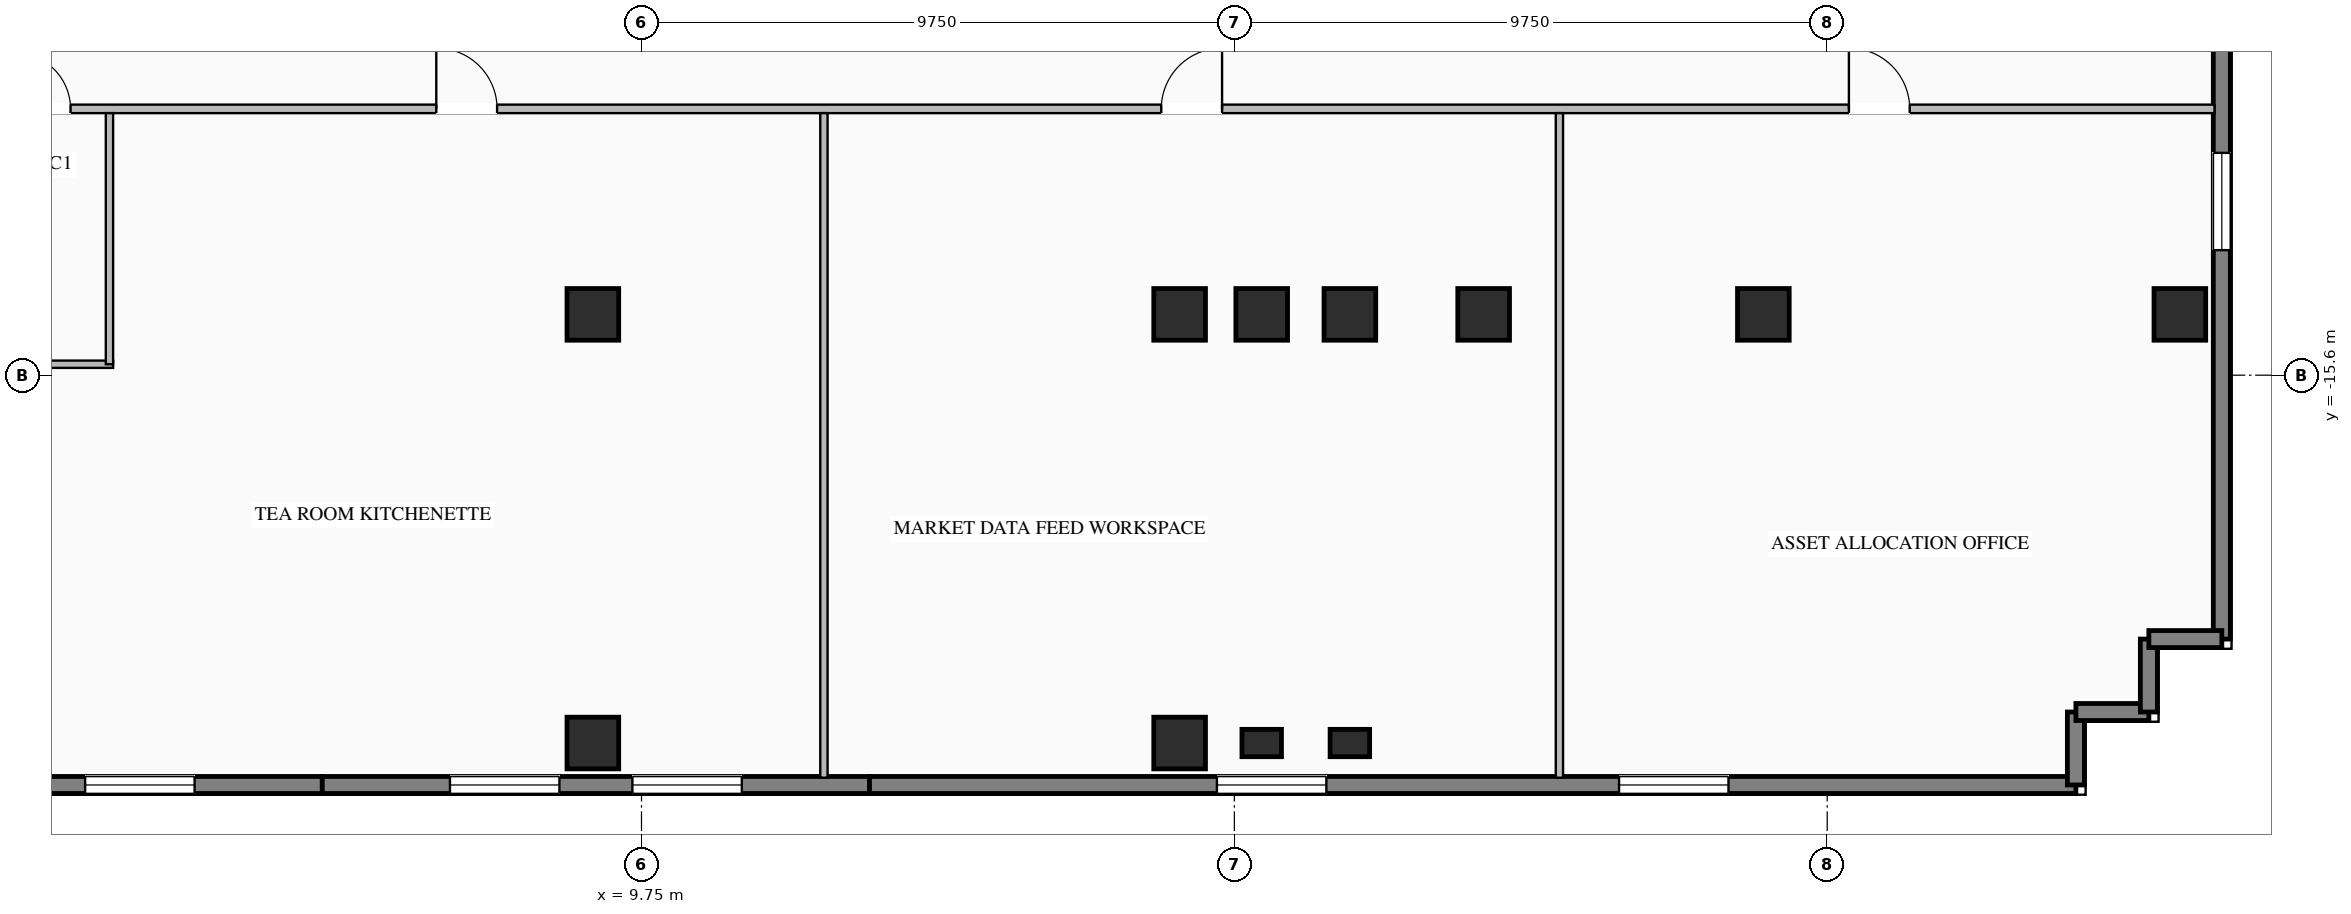
"""IFC4 building model, lengths in metres.
Left out: names, types, materials, properties, quantities, classifications, styles, units other than length and angle.
Written with IfcOpenShell. Run it as: python <this file> out.ifc"""

import sys

from ifc_helpers import new_model, si_unit, direction, frame, frame_2d, origin, origin_2d, place, context, subcontext, project, spatial, rectangle, i_section, extrude, element, fill, save


model = new_model("IFC4")
c1 = context("Model", 3, precision=1e-05, world=origin(), true_north=direction((0.0, 1.0)))
c2 = subcontext(c1, "Body", "Model", "MODEL_VIEW")
j1 = project(units=[si_unit("LENGTHUNIT", "METRE"), si_unit("PLANEANGLEUNIT", "RADIAN")], contexts=[c1])
p1 = place(None, origin())
s1 = spatial("IfcSite", under=j1, at=p1, CompositionType="ELEMENT")
p2 = place(p1, origin())
s2 = spatial("IfcBuilding", under=s1, at=p2, CompositionType="ELEMENT")
p3 = place(p2, frame((0.0, 0.0, 51.9)))
s3 = spatial("IfcBuildingStorey", under=s2, at=p3, CompositionType="ELEMENT", Elevation=51.9)
for number, where, z_axis, x_axis in (
    (1, (8.95, -14.6, 0.0), (0.0, 0.0, 1.0), (1.0, 0.0, 0.0)),
    (2, (18.6, -14.6, 0.0), (0.0, 0.0, 1.0), (1.0, 0.0, 0.0)),
    (3, (19.95, -14.6, 0.0), (0.0, 0.0, 1.0), (1.0, 0.0, 0.0)),
    (4, (21.4, -14.6, 0.0), (0.0, 0.0, 1.0), (1.0, 0.0, 0.0)),
    (5, (23.6, -14.6, 0.0), (0.0, 0.0, 1.0), (1.0, 0.0, 0.0)),
    (6, (28.2, -14.6, 0.0), (0.0, 0.0, 1.0), (1.0, 0.0, 0.0)),
    (7, (8.95, -21.65, 0.0), (0.0, 0.0, 1.0), (1.0, 0.0, 0.0)),
    (8, (18.6, -21.65, 0.0), (0.0, 0.0, 1.0), (1.0, 0.0, 0.0)),
    (9, (35.05, -14.6, 0.0), (0.0, 0.0, 1.0), (1.0, 0.0, 0.0)),
):
    element("IfcColumn", number, at=place(p3, frame(where, z_axis=z_axis, x_axis=x_axis)), inside=s3, PredefinedType="COLUMN", context=c2, shape_type="SweptSolid", body=[
        extrude(i_section(OverallWidth=0.85, OverallDepth=0.85, WebThickness=0.032, FlangeThickness=0.048, at=origin_2d()), origin(), (0.0, 0.0, 1.0), 3.45),
    ])
for number, where, z_axis, x_axis in (
    (10, (19.95, -21.65, 0.0), (0.0, 0.0, 1.0), (1.0, 0.0, 0.0)),
    (11, (21.4, -21.65, 0.0), (0.0, 0.0, 1.0), (1.0, 0.0, 0.0)),
):
    element("IfcColumn", number, at=place(p3, frame(where, z_axis=z_axis, x_axis=x_axis)), inside=s3, PredefinedType="PILASTER", context=c2, shape_type="SweptSolid", body=[
        extrude(rectangle(XDim=0.65, YDim=0.45, at=origin_2d()), origin(), (0.0, 0.0, 1.0), 3.45),
    ])
p4 = place(p3, frame((4.5, -22.34, 0.0), z_axis=(0.0, 0.0, 1.0), x_axis=(-1.0, 0.0, 0.0)))
e12 = element("IfcWall", 12, at=p4, inside=s3, PredefinedType="STANDARD", context=c2, shape_type="SweptSolid", body=[
    extrude(rectangle(XDim=9.0, YDim=0.28, at=frame_2d((4.5, 0.0))), origin(), (0.0, 0.0, 1.0), 3.25),
])
p5 = place(p4, frame((2.1, 0.0, 0.76)))
e13 = element("IfcOpeningElement", 13, at=p5, cuts=e12, PredefinedType="OPENING", context=c2, shape_type="SweptSolid", body=[
    extrude(rectangle(XDim=1.8, YDim=1.95, at=frame_2d((0.9, 0.975))), frame((0.0, 0.15, 0.0), z_axis=(0.0, -1.0, 0.0), x_axis=(1.0, 0.0, 0.0)), (0.0, 0.0, 1.0), 0.3),
])
p6 = place(p4, frame((5.1, 0.0, 0.76)))
e14 = element("IfcOpeningElement", 14, at=p6, cuts=e12, PredefinedType="OPENING", context=c2, shape_type="SweptSolid", body=[
    extrude(rectangle(XDim=1.8, YDim=1.95, at=frame_2d((0.9, 0.975))), frame((0.0, 0.15, 0.0), z_axis=(0.0, -1.0, 0.0), x_axis=(1.0, 0.0, 0.0)), (0.0, 0.0, 1.0), 0.3),
])
p7 = place(p3, frame((13.5, -22.34, 0.0), z_axis=(0.0, 0.0, 1.0), x_axis=(-1.0, 0.0, 0.0)))
e15 = element("IfcWall", 15, at=p7, inside=s3, PredefinedType="STANDARD", context=c2, shape_type="SweptSolid", body=[
    extrude(rectangle(XDim=9.0, YDim=0.28, at=frame_2d((4.5, 0.0))), origin(), (0.0, 0.0, 1.0), 3.25),
])
p8 = place(p7, frame((2.1, 0.0, 0.76)))
e16 = element("IfcOpeningElement", 16, at=p8, cuts=e15, PredefinedType="OPENING", context=c2, shape_type="SweptSolid", body=[
    extrude(rectangle(XDim=1.8, YDim=1.95, at=frame_2d((0.9, 0.975))), frame((0.0, 0.15, 0.0), z_axis=(0.0, -1.0, 0.0), x_axis=(1.0, 0.0, 0.0)), (0.0, 0.0, 1.0), 0.3),
])
p9 = place(p7, frame((5.1, 0.0, 0.76)))
e17 = element("IfcOpeningElement", 17, at=p9, cuts=e15, PredefinedType="OPENING", context=c2, shape_type="SweptSolid", body=[
    extrude(rectangle(XDim=1.8, YDim=1.95, at=frame_2d((0.9, 0.975))), frame((0.0, 0.15, 0.0), z_axis=(0.0, -1.0, 0.0), x_axis=(1.0, 0.0, 0.0)), (0.0, 0.0, 1.0), 0.3),
])
p10 = place(p3, frame((33.34, -22.34, 0.0), z_axis=(0.0, 0.0, 1.0), x_axis=(-1.0, 0.0, 0.0)))
e18 = element("IfcWall", 18, at=p10, inside=s3, PredefinedType="STANDARD", context=c2, shape_type="SweptSolid", body=[
    extrude(rectangle(XDim=19.84, YDim=0.28, at=frame_2d((9.92, 0.0))), origin(), (0.0, 0.0, 1.0), 3.25),
])
p11 = place(p10, frame((5.713, 0.0, 0.76)))
e19 = element("IfcOpeningElement", 19, at=p11, cuts=e18, PredefinedType="OPENING", context=c2, shape_type="SweptSolid", body=[
    extrude(rectangle(XDim=1.8, YDim=1.95, at=frame_2d((0.9, 0.975))), frame((0.0, 0.15, 0.0), z_axis=(0.0, -1.0, 0.0), x_axis=(1.0, 0.0, 0.0)), (0.0, 0.0, 1.0), 0.3),
])
p12 = place(p10, frame((12.327, 0.0, 0.76)))
e20 = element("IfcOpeningElement", 20, at=p12, cuts=e18, PredefinedType="OPENING", context=c2, shape_type="SweptSolid", body=[
    extrude(rectangle(XDim=1.8, YDim=1.95, at=frame_2d((0.9, 0.975))), frame((0.0, 0.15, 0.0), z_axis=(0.0, -1.0, 0.0), x_axis=(1.0, 0.0, 0.0)), (0.0, 0.0, 1.0), 0.3),
])
p13 = place(p3, frame((35.74, 0.0, 0.0), z_axis=(0.0, 0.0, 1.0), x_axis=(0.0, -1.0, 0.0)))
e21 = element("IfcWall", 21, at=p13, inside=s3, PredefinedType="STANDARD", context=c2, shape_type="SweptSolid", body=[
    extrude(rectangle(XDim=19.94, YDim=0.28, at=frame_2d((9.97, 0.0))), origin(), (0.0, 0.0, 1.0), 3.25),
])
p14 = place(p13, frame((5.847, 0.0, 0.76)))
e22 = element("IfcOpeningElement", 22, at=p14, cuts=e21, PredefinedType="OPENING", context=c2, shape_type="SweptSolid", body=[
    extrude(rectangle(XDim=1.6, YDim=1.95, at=frame_2d((0.8, 0.975))), frame((0.0, 0.15, 0.0), z_axis=(0.0, -1.0, 0.0), x_axis=(1.0, 0.0, 0.0)), (0.0, 0.0, 1.0), 0.3),
])
p15 = place(p13, frame((11.943, 0.0, 0.76)))
e23 = element("IfcOpeningElement", 23, at=p15, cuts=e21, PredefinedType="OPENING", context=c2, shape_type="SweptSolid", body=[
    extrude(rectangle(XDim=1.6, YDim=1.95, at=frame_2d((0.8, 0.975))), frame((0.0, 0.15, 0.0), z_axis=(0.0, -1.0, 0.0), x_axis=(1.0, 0.0, 0.0)), (0.0, 0.0, 1.0), 0.3),
])
p16 = place(p3, frame((33.34, -22.34, 0.0), z_axis=(0.0, 0.0, 1.0), x_axis=(0.0, 1.0, 0.0)))
e24 = element("IfcWall", 24, at=p16, inside=s3, PredefinedType="STANDARD", context=c2, shape_type="SweptSolid", body=[
    extrude(rectangle(XDim=1.2, YDim=0.28, at=frame_2d((0.6, 0.0))), origin(), (0.0, 0.0, 1.0), 3.25),
])
for number, where, z_axis, x_axis in (
    (25, (33.34, -21.14, 0.0), (0.0, 0.0, 1.0), (1.0, 0.0, 0.0)),
    (26, (34.54, -21.14, 0.0), (0.0, 0.0, 1.0), (0.0, 1.0, 0.0)),
    (27, (34.54, -19.94, 0.0), (0.0, 0.0, 1.0), (1.0, 0.0, 0.0)),
):
    element("IfcWall", number, at=place(p3, frame(where, z_axis=z_axis, x_axis=x_axis)), inside=s3, PredefinedType="STANDARD", context=c2, shape_type="SweptSolid", body=[
        extrude(rectangle(XDim=1.2, YDim=0.28, at=frame_2d((0.6, 0.0))), origin(), (0.0, 0.0, 1.0), 3.25),
    ])
p17 = place(p3, frame((-35.62, -11.22, 0.0), z_axis=(0.0, 0.0, 1.0), x_axis=(1.0, 0.0, 0.0)))
e28 = element("IfcWall", 28, at=p17, inside=s3, PredefinedType="STANDARD", context=c2, shape_type="SweptSolid", body=[
    extrude(rectangle(XDim=71.24, YDim=0.14, at=frame_2d((35.62, 0.0))), origin(), (0.0, 0.0, 1.0), 2.745),
])
p18 = place(p17, frame((28.71, 0.0, 0.0)))
e29 = element("IfcOpeningElement", 29, at=p18, cuts=e28, PredefinedType="OPENING", context=c2, shape_type="SweptSolid", body=[
    extrude(rectangle(XDim=0.92, YDim=2.08, at=frame_2d((0.46, 1.04))), frame((0.0, 0.08, 0.0), z_axis=(0.0, -1.0, 0.0), x_axis=(1.0, 0.0, 0.0)), (0.0, 0.0, 1.0), 0.16),
])
p19 = place(p17, frame((32.21, 0.0, 0.0)))
e30 = element("IfcOpeningElement", 30, at=p19, cuts=e28, PredefinedType="OPENING", context=c2, shape_type="SweptSolid", body=[
    extrude(rectangle(XDim=0.92, YDim=2.08, at=frame_2d((0.46, 1.04))), frame((0.0, 0.08, 0.0), z_axis=(0.0, -1.0, 0.0), x_axis=(1.0, 0.0, 0.0)), (0.0, 0.0, 1.0), 0.16),
])
p20 = place(p17, frame((35.06, 0.0, 0.0)))
e31 = element("IfcOpeningElement", 31, at=p20, cuts=e28, PredefinedType="OPENING", context=c2, shape_type="SweptSolid", body=[
    extrude(rectangle(XDim=0.92, YDim=2.08, at=frame_2d((0.46, 1.04))), frame((0.0, 0.08, 0.0), z_axis=(0.0, -1.0, 0.0), x_axis=(1.0, 0.0, 0.0)), (0.0, 0.0, 1.0), 0.16),
])
p21 = place(p17, frame((4.307, 0.0, 0.0)))
e32 = element("IfcOpeningElement", 32, at=p21, cuts=e28, PredefinedType="OPENING", context=c2, shape_type="SweptSolid", body=[
    extrude(rectangle(XDim=1.0, YDim=2.08, at=frame_2d((0.5, 1.04))), frame((0.0, 0.08, 0.0), z_axis=(0.0, -1.0, 0.0), x_axis=(1.0, 0.0, 0.0)), (0.0, 0.0, 1.0), 0.16),
])
p22 = place(p17, frame((13.65, 0.0, 0.0)))
e33 = element("IfcOpeningElement", 33, at=p22, cuts=e28, PredefinedType="OPENING", context=c2, shape_type="SweptSolid", body=[
    extrude(rectangle(XDim=1.0, YDim=2.08, at=frame_2d((0.5, 1.04))), frame((0.0, 0.08, 0.0), z_axis=(0.0, -1.0, 0.0), x_axis=(1.0, 0.0, 0.0)), (0.0, 0.0, 1.0), 0.16),
])
p23 = place(p17, frame((22.679, 0.0, 0.0)))
e34 = element("IfcOpeningElement", 34, at=p23, cuts=e28, PredefinedType="OPENING", context=c2, shape_type="SweptSolid", body=[
    extrude(rectangle(XDim=1.0, YDim=2.08, at=frame_2d((0.5, 1.04))), frame((0.0, 0.08, 0.0), z_axis=(0.0, -1.0, 0.0), x_axis=(1.0, 0.0, 0.0)), (0.0, 0.0, 1.0), 0.16),
])
p24 = place(p17, frame((41.995, 0.0, 0.0)))
e35 = element("IfcOpeningElement", 35, at=p24, cuts=e28, PredefinedType="OPENING", context=c2, shape_type="SweptSolid", body=[
    extrude(rectangle(XDim=1.0, YDim=2.08, at=frame_2d((0.5, 1.04))), frame((0.0, 0.08, 0.0), z_axis=(0.0, -1.0, 0.0), x_axis=(1.0, 0.0, 0.0)), (0.0, 0.0, 1.0), 0.16),
])
p25 = place(p17, frame((53.918, 0.0, 0.0)))
e36 = element("IfcOpeningElement", 36, at=p25, cuts=e28, PredefinedType="OPENING", context=c2, shape_type="SweptSolid", body=[
    extrude(rectangle(XDim=1.0, YDim=2.08, at=frame_2d((0.5, 1.04))), frame((0.0, 0.08, 0.0), z_axis=(0.0, -1.0, 0.0), x_axis=(1.0, 0.0, 0.0)), (0.0, 0.0, 1.0), 0.16),
])
p26 = place(p17, frame((65.227, 0.0, 0.0)))
e37 = element("IfcOpeningElement", 37, at=p26, cuts=e28, PredefinedType="OPENING", context=c2, shape_type="SweptSolid", body=[
    extrude(rectangle(XDim=1.0, YDim=2.08, at=frame_2d((0.5, 1.04))), frame((0.0, 0.08, 0.0), z_axis=(0.0, -1.0, 0.0), x_axis=(1.0, 0.0, 0.0)), (0.0, 0.0, 1.0), 0.16),
])
p27 = place(p3, frame((-8.26, -15.42, 0.0), z_axis=(0.0, 0.0, 1.0), x_axis=(1.0, 0.0, 0.0)))
e38 = element("IfcWall", 38, at=p27, inside=s3, PredefinedType="STANDARD", context=c2, shape_type="SweptSolid", body=[
    extrude(rectangle(XDim=9.32, YDim=0.12, at=frame_2d((4.66, 0.0))), origin(), (0.0, 0.0, 1.0), 3.25),
])
p28 = place(p3, frame((1.0, -15.42, 0.0), z_axis=(0.0, 0.0, 1.0), x_axis=(0.0, 1.0, 0.0)))
e39 = element("IfcWall", 39, at=p28, inside=s3, PredefinedType="STANDARD", context=c2, shape_type="SweptSolid", body=[
    extrude(rectangle(XDim=4.13, YDim=0.12, at=frame_2d((2.065, 0.0))), origin(), (0.0, 0.0, 1.0), 3.25),
])
for number, where, z_axis, x_axis in (
    (40, (12.75, -22.22, 0.0), (0.0, 0.0, 1.0), (0.0, 1.0, 0.0)),
    (41, (24.846, -22.22, 0.0), (0.0, 0.0, 1.0), (0.0, 1.0, 0.0)),
):
    element("IfcWall", number, at=place(p3, frame(where, z_axis=z_axis, x_axis=x_axis)), inside=s3, PredefinedType="STANDARD", context=c2, shape_type="SweptSolid", body=[
        extrude(rectangle(XDim=10.93, YDim=0.12, at=frame_2d((5.465, 0.0))), origin(), (0.0, 0.0, 1.0), 3.25),
    ])
p29 = place(p5, origin())
e42 = element("IfcWindow", 42, at=p29, inside=s3, PartitioningType="SINGLE_PANEL", PredefinedType="WINDOW", context=c2, shape_type="SweptSolid", body=[
    extrude(rectangle(XDim=1.8, YDim=1.95, at=frame_2d((0.9, 0.975))), frame((0.0, 0.03, 0.0), z_axis=(0.0, -1.0, 0.0), x_axis=(1.0, 0.0, 0.0)), (0.0, 0.0, 1.0), 0.06),
])
fill(e13, e42)
p30 = place(p8, origin())
e43 = element("IfcWindow", 43, at=p30, inside=s3, PartitioningType="SINGLE_PANEL", PredefinedType="WINDOW", context=c2, shape_type="SweptSolid", body=[
    extrude(rectangle(XDim=1.8, YDim=1.95, at=frame_2d((0.9, 0.975))), frame((0.0, 0.03, 0.0), z_axis=(0.0, -1.0, 0.0), x_axis=(1.0, 0.0, 0.0)), (0.0, 0.0, 1.0), 0.06),
])
fill(e16, e43)
p31 = place(p9, origin())
e44 = element("IfcWindow", 44, at=p31, inside=s3, PartitioningType="SINGLE_PANEL", PredefinedType="WINDOW", context=c2, shape_type="SweptSolid", body=[
    extrude(rectangle(XDim=1.8, YDim=1.95, at=frame_2d((0.9, 0.975))), frame((0.0, 0.03, 0.0), z_axis=(0.0, -1.0, 0.0), x_axis=(1.0, 0.0, 0.0)), (0.0, 0.0, 1.0), 0.06),
])
fill(e17, e44)
p32 = place(p11, origin())
e45 = element("IfcWindow", 45, at=p32, inside=s3, PartitioningType="SINGLE_PANEL", PredefinedType="WINDOW", context=c2, shape_type="SweptSolid", body=[
    extrude(rectangle(XDim=1.8, YDim=1.95, at=frame_2d((0.9, 0.975))), frame((0.0, 0.03, 0.0), z_axis=(0.0, -1.0, 0.0), x_axis=(1.0, 0.0, 0.0)), (0.0, 0.0, 1.0), 0.06),
])
fill(e19, e45)
p33 = place(p12, origin())
e46 = element("IfcWindow", 46, at=p33, inside=s3, PartitioningType="SINGLE_PANEL", PredefinedType="WINDOW", context=c2, shape_type="SweptSolid", body=[
    extrude(rectangle(XDim=1.8, YDim=1.95, at=frame_2d((0.9, 0.975))), frame((0.0, 0.03, 0.0), z_axis=(0.0, -1.0, 0.0), x_axis=(1.0, 0.0, 0.0)), (0.0, 0.0, 1.0), 0.06),
])
fill(e20, e46)
p34 = place(p15, origin())
e47 = element("IfcWindow", 47, at=p34, inside=s3, PartitioningType="SINGLE_PANEL", PredefinedType="WINDOW", context=c2, shape_type="SweptSolid", body=[
    extrude(rectangle(XDim=1.6, YDim=1.95, at=frame_2d((0.8, 0.975))), frame((0.0, 0.03, 0.0), z_axis=(0.0, -1.0, 0.0), x_axis=(1.0, 0.0, 0.0)), (0.0, 0.0, 1.0), 0.06),
])
fill(e23, e47)
p35 = place(p20, origin())
e48 = element("IfcDoor", 48, at=p35, inside=s3, OperationType="SINGLE_SWING_LEFT", PredefinedType="DOOR", context=c2, shape_type="SweptSolid", body=[
    extrude(rectangle(XDim=0.92, YDim=2.08, at=frame_2d((0.46, 1.04))), frame((0.0, 0.025, 0.0), z_axis=(0.0, -1.0, 0.0), x_axis=(1.0, 0.0, 0.0)), (0.0, 0.0, 1.0), 0.05),
])
fill(e31, e48)
p36 = place(p24, origin())
e49 = element("IfcDoor", 49, at=p36, inside=s3, OperationType="SINGLE_SWING_LEFT", PredefinedType="DOOR", context=c2, shape_type="SweptSolid", body=[
    extrude(rectangle(XDim=1.0, YDim=2.08, at=frame_2d((0.5, 1.04))), frame((0.0, 0.025, 0.0), z_axis=(0.0, -1.0, 0.0), x_axis=(1.0, 0.0, 0.0)), (0.0, 0.0, 1.0), 0.05),
])
fill(e35, e49)
p37 = place(p25, origin())
e50 = element("IfcDoor", 50, at=p37, inside=s3, OperationType="SINGLE_SWING_RIGHT", PredefinedType="DOOR", context=c2, shape_type="SweptSolid", body=[
    extrude(rectangle(XDim=1.0, YDim=2.08, at=frame_2d((0.5, 1.04))), frame((0.0, 0.025, 0.0), z_axis=(0.0, -1.0, 0.0), x_axis=(1.0, 0.0, 0.0)), (0.0, 0.0, 1.0), 0.05),
])
fill(e36, e50)
p38 = place(p26, origin())
e51 = element("IfcDoor", 51, at=p38, inside=s3, OperationType="SINGLE_SWING_LEFT", PredefinedType="DOOR", context=c2, shape_type="SweptSolid", body=[
    extrude(rectangle(XDim=1.0, YDim=2.08, at=frame_2d((0.5, 1.04))), frame((0.0, 0.025, 0.0), z_axis=(0.0, -1.0, 0.0), x_axis=(1.0, 0.0, 0.0)), (0.0, 0.0, 1.0), 0.05),
])
fill(e37, e51)
save(model, sys.argv[1])
